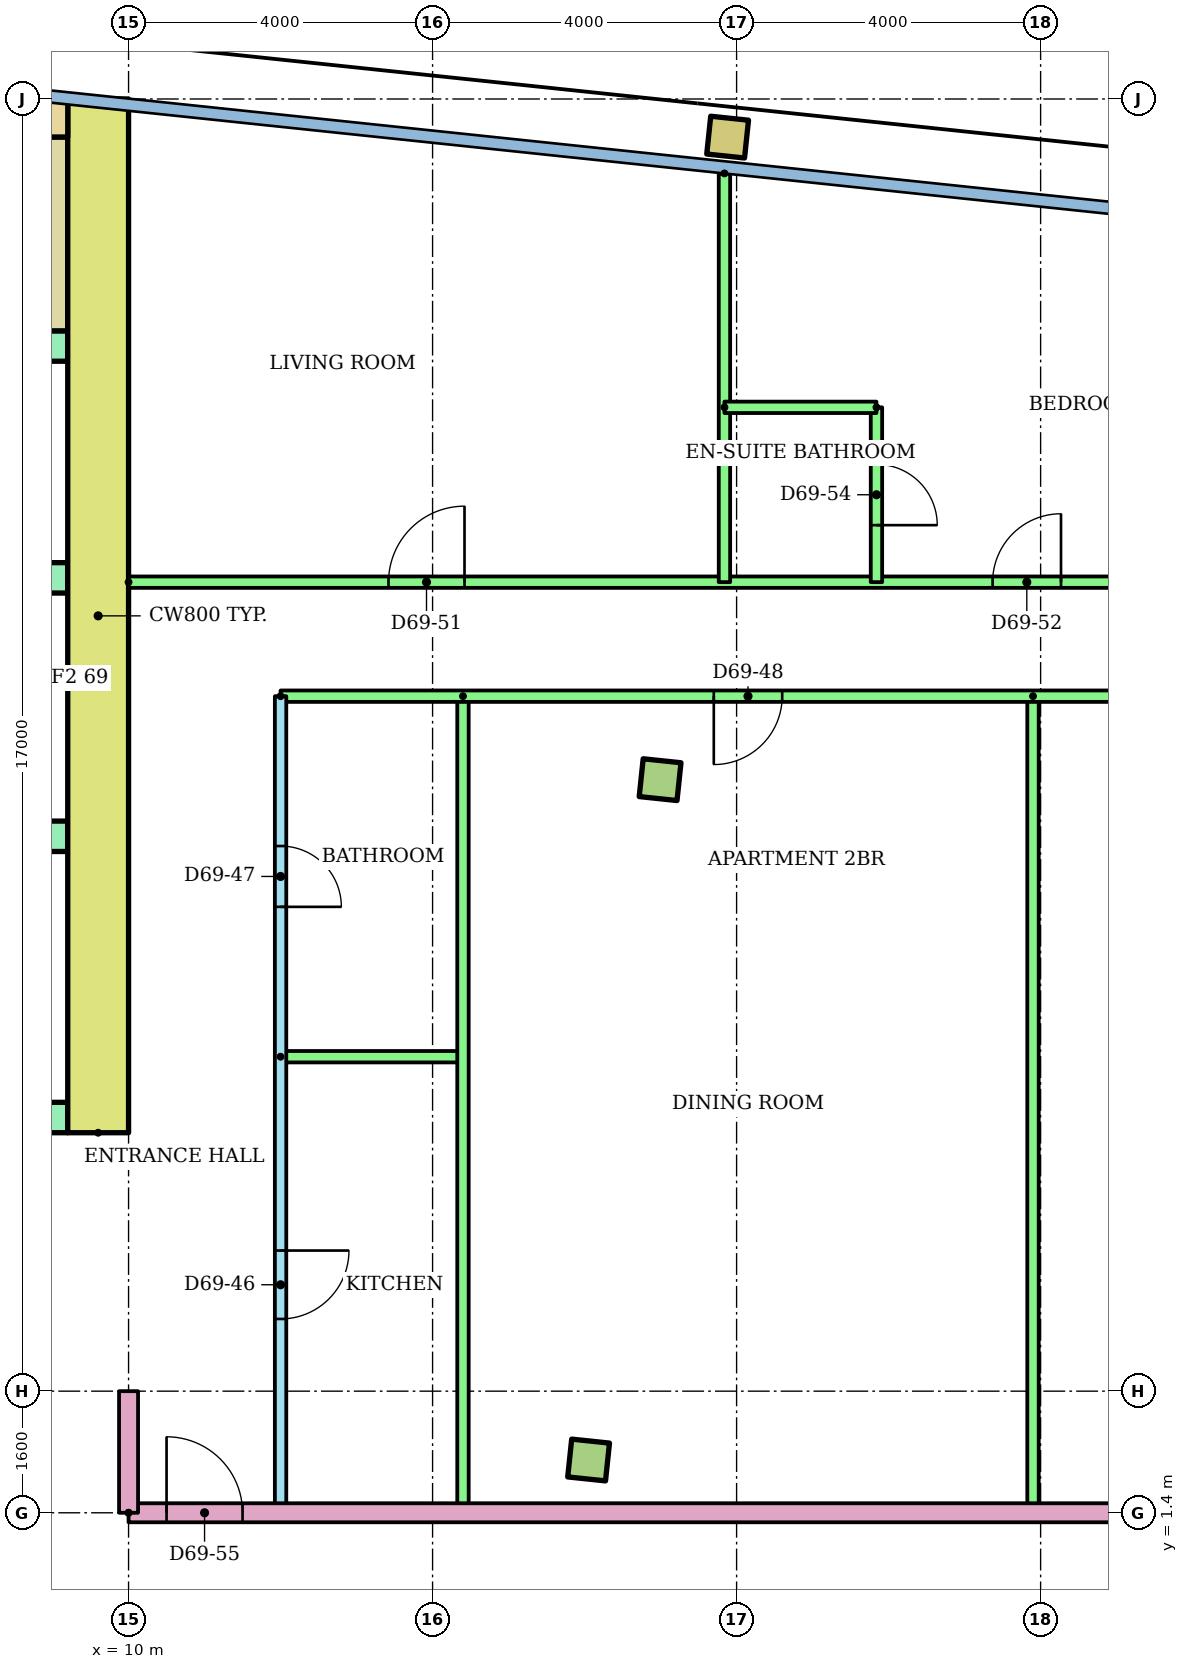
"""IFC4 building model, lengths in metres.
Left out: names, types, materials, properties, quantities, classifications, styles, units other than length and angle.
Written with IfcOpenShell. Run it as: python <this file> out.ifc"""

import sys

from ifc_helpers import new_model, si_unit, direction, frame, frame_2d, origin, origin_2d, place, context, subcontext, project, spatial, rectangle, hollow_rectangle, extrude, element, fill, save


model = new_model("IFC4")
c1 = context("Model", 3, precision=1e-05, world=origin(), true_north=direction((0.0, 1.0)))
c2 = subcontext(c1, "Body", "Model", "MODEL_VIEW")
j1 = project(units=[si_unit("LENGTHUNIT", "METRE"), si_unit("PLANEANGLEUNIT", "RADIAN")], contexts=[c1])
p1 = place(None, origin())
s1 = spatial("IfcSite", under=j1, at=p1, CompositionType="ELEMENT")
p2 = place(p1, origin())
s2 = spatial("IfcBuilding", under=s1, at=p2, CompositionType="ELEMENT")
p3 = place(p2, frame((0.0, 0.0, 265.9)))
s3 = spatial("IfcBuildingStorey", under=s2, at=p3, CompositionType="ELEMENT", Elevation=265.9)
for number, where, z_axis, x_axis in (
    (1, (16.053, 2.094, 0.0), (0.0, 0.0, 1.0), (0.995, -0.105, 0.0)),
    (2, (16.993, 11.045, 0.0), (0.0, 0.0, 1.0), (0.995, -0.105, 0.0)),
):
    element("IfcColumn", number, at=place(p3, frame(where, z_axis=z_axis, x_axis=x_axis)), inside=s3, PredefinedType="COLUMN", context=c2, shape_type="SweptSolid", body=[
        extrude(rectangle(XDim=0.5, YDim=0.5, at=origin_2d()), origin(), (0.0, 0.0, 1.0), 3.2),
    ])
p4 = place(p3, frame((17.882, 19.498, 0.0), z_axis=(0.0, 0.0, 1.0), x_axis=(0.994521895368, -0.104528463268, 0.0)))
e3 = element("IfcColumn", 3, at=p4, inside=s3, PredefinedType="COLUMN", context=c2, shape_type="SweptSolid", body=[
    extrude(hollow_rectangle(XDim=0.5, YDim=0.5, WallThickness=0.025, at=origin_2d()), origin(), (0.0, 0.0, 1.0), 3.2),
])
p5 = place(p3, frame((9.6, 6.4, 0.0), z_axis=(0.0, 0.0, 1.0), x_axis=(0.0, 1.0, 0.0)))
e4 = element("IfcWall", 4, at=p5, inside=s3, PredefinedType="SHEAR", context=c2, shape_type="SweptSolid", body=[
    extrude(rectangle(XDim=13.6, YDim=0.8, at=frame_2d((6.8, 0.0))), origin(), (0.0, 0.0, 1.0), 2.92),
])
p6 = place(p3, frame((-9.2, 19.75, 0.0)))
e5 = element("IfcWall", 5, at=p6, inside=s3, PredefinedType="SHEAR", context=c2, shape_type="SweptSolid", body=[
    extrude(rectangle(XDim=18.4, YDim=0.5, at=frame_2d((9.2, 0.0))), origin(), (0.0, 0.0, 1.0), 2.92),
])
p7 = place(p3, frame((-9.2, 6.6, 0.0)))
e6 = element("IfcWall", 6, at=p7, inside=s3, PredefinedType="SHEAR", context=c2, shape_type="SweptSolid", body=[
    extrude(rectangle(XDim=18.4, YDim=0.4, at=frame_2d((9.2, 0.0))), origin(), (0.0, 0.0, 1.0), 2.92),
])
p8 = place(p7, frame((8.3, 0.0, 0.0)))
e7 = element("IfcOpeningElement", 7, at=p8, cuts=e6, PredefinedType="OPENING", context=c2, shape_type="SweptSolid", body=[
    extrude(rectangle(XDim=1.8, YDim=2.1, at=frame_2d((0.9, 1.05))), frame((0.0, 0.21, 0.0), z_axis=(0.0, -1.0, 0.0), x_axis=(1.0, 0.0, 0.0)), (0.0, 0.0, 1.0), 0.42),
])
p9 = place(p7, frame((3.8, 0.0, 0.0)))
e8 = element("IfcOpeningElement", 8, at=p9, cuts=e6, PredefinedType="OPENING", context=c2, shape_type="SweptSolid", body=[
    extrude(rectangle(XDim=1.8, YDim=2.1, at=frame_2d((0.9, 1.05))), frame((0.0, 0.21, 0.0), z_axis=(0.0, -1.0, 0.0), x_axis=(1.0, 0.0, 0.0)), (0.0, 0.0, 1.0), 0.42),
])
p10 = place(p7, frame((12.8, 0.0, 0.0)))
e9 = element("IfcOpeningElement", 9, at=p10, cuts=e6, PredefinedType="OPENING", context=c2, shape_type="SweptSolid", body=[
    extrude(rectangle(XDim=1.8, YDim=2.1, at=frame_2d((0.9, 1.05))), frame((0.0, 0.21, 0.0), z_axis=(0.0, -1.0, 0.0), x_axis=(1.0, 0.0, 0.0)), (0.0, 0.0, 1.0), 0.42),
])
p11 = place(p3, frame((1.2, 10.3, 0.0)))
e10 = element("IfcWall", 10, at=p11, inside=s3, PredefinedType="SHEAR", context=c2, shape_type="SweptSolid", body=[
    extrude(rectangle(XDim=8.0, YDim=0.4, at=frame_2d((4.0, 0.0))), origin(), (0.0, 0.0, 1.0), 2.92),
])
p12 = place(p11, frame((0.817, 0.0, 0.0)))
e11 = element("IfcOpeningElement", 11, at=p12, cuts=e10, PredefinedType="OPENING", context=c2, shape_type="SweptSolid", body=[
    extrude(rectangle(XDim=1.1, YDim=2.1, at=frame_2d((0.55, 1.05))), frame((0.0, 0.21, 0.0), z_axis=(0.0, -1.0, 0.0), x_axis=(1.0, 0.0, 0.0)), (0.0, 0.0, 1.0), 0.42),
])
p13 = place(p11, frame((3.55, 0.0, 0.0)))
e12 = element("IfcOpeningElement", 12, at=p13, cuts=e10, PredefinedType="OPENING", context=c2, shape_type="SweptSolid", body=[
    extrude(rectangle(XDim=1.1, YDim=2.1, at=frame_2d((0.55, 1.05))), frame((0.0, 0.21, 0.0), z_axis=(0.0, -1.0, 0.0), x_axis=(1.0, 0.0, 0.0)), (0.0, 0.0, 1.0), 0.42),
])
p14 = place(p11, frame((6.283, 0.0, 0.0)))
e13 = element("IfcOpeningElement", 13, at=p14, cuts=e10, PredefinedType="OPENING", context=c2, shape_type="SweptSolid", body=[
    extrude(rectangle(XDim=1.1, YDim=2.1, at=frame_2d((0.55, 1.05))), frame((0.0, 0.21, 0.0), z_axis=(0.0, -1.0, 0.0), x_axis=(1.0, 0.0, 0.0)), (0.0, 0.0, 1.0), 0.42),
])
p15 = place(p3, frame((1.2, 13.7, 0.0)))
e14 = element("IfcWall", 14, at=p15, inside=s3, PredefinedType="SHEAR", context=c2, shape_type="SweptSolid", body=[
    extrude(rectangle(XDim=8.0, YDim=0.4, at=frame_2d((4.0, 0.0))), origin(), (0.0, 0.0, 1.0), 2.92),
])
p16 = place(p3, frame((-9.2, 16.75, 0.0)))
e15 = element("IfcWall", 15, at=p16, inside=s3, PredefinedType="SHEAR", context=c2, shape_type="SweptSolid", body=[
    extrude(rectangle(XDim=18.4, YDim=0.4, at=frame_2d((9.2, 0.0))), origin(), (0.0, 0.0, 1.0), 2.92),
])
p17 = place(p16, frame((0.1, 0.0, 0.0)))
e16 = element("IfcOpeningElement", 16, at=p17, cuts=e15, PredefinedType="OPENING", context=c2, shape_type="SweptSolid", body=[
    extrude(rectangle(XDim=0.95, YDim=2.1, at=frame_2d((0.475, 1.05))), frame((0.0, 0.21, 0.0), z_axis=(0.0, -1.0, 0.0), x_axis=(1.0, 0.0, 0.0)), (0.0, 0.0, 1.0), 0.42),
])
p18 = place(p16, frame((6.1, 0.0, 0.0)))
e17 = element("IfcOpeningElement", 17, at=p18, cuts=e15, PredefinedType="OPENING", context=c2, shape_type="SweptSolid", body=[
    extrude(rectangle(XDim=0.95, YDim=2.1, at=frame_2d((0.475, 1.05))), frame((0.0, 0.21, 0.0), z_axis=(0.0, -1.0, 0.0), x_axis=(1.0, 0.0, 0.0)), (0.0, 0.0, 1.0), 0.42),
])
p19 = place(p16, frame((12.1, 0.0, 0.0)))
e18 = element("IfcOpeningElement", 18, at=p19, cuts=e15, PredefinedType="OPENING", context=c2, shape_type="SweptSolid", body=[
    extrude(rectangle(XDim=0.95, YDim=2.1, at=frame_2d((0.475, 1.05))), frame((0.0, 0.21, 0.0), z_axis=(0.0, -1.0, 0.0), x_axis=(1.0, 0.0, 0.0)), (0.0, 0.0, 1.0), 0.42),
])
p20 = place(p3, frame((8.75, 16.95, 0.0), z_axis=(0.0, 0.0, 1.0), x_axis=(0.0, 1.0, 0.0)))
e19 = element("IfcWall", 19, at=p20, inside=s3, PredefinedType="SHEAR", context=c2, shape_type="SweptSolid", body=[
    extrude(rectangle(XDim=2.55, YDim=0.9, at=frame_2d((1.275, 0.0))), origin(), (0.0, 0.0, 1.0), 2.92),
])
p21 = place(p3, frame((12.0, 12.143, 0.0), z_axis=(0.0, 0.0, 1.0), x_axis=(0.0, -1.0, 0.0)))
e20 = element("IfcWall", 20, at=p21, inside=s3, PredefinedType="PARTITIONING", context=c2, shape_type="SweptSolid", body=[
    extrude(rectangle(XDim=10.743, YDim=0.15, at=frame_2d((5.372, 0.0))), origin(), (0.0, 0.0, 1.0), 2.4),
])
p22 = place(p21, frame((7.293, 0.0, 0.0)))
e21 = element("IfcOpeningElement", 21, at=p22, cuts=e20, PredefinedType="OPENING", context=c2, shape_type="SweptSolid", body=[
    extrude(rectangle(XDim=0.9, YDim=2.1, at=frame_2d((0.45, 1.05))), frame((0.0, 0.085, 0.0), z_axis=(0.0, -1.0, 0.0), x_axis=(1.0, 0.0, 0.0)), (0.0, 0.0, 1.0), 0.17),
])
p23 = place(p21, frame((1.972, 0.0, 0.0)))
e22 = element("IfcOpeningElement", 22, at=p23, cuts=e20, PredefinedType="OPENING", context=c2, shape_type="SweptSolid", body=[
    extrude(rectangle(XDim=0.8, YDim=2.1, at=frame_2d((0.4, 1.05))), frame((0.0, 0.085, 0.0), z_axis=(0.0, -1.0, 0.0), x_axis=(1.0, 0.0, 0.0)), (0.0, 0.0, 1.0), 0.17),
])
p24 = place(p3, frame((12.0, 7.4, 0.0)))
e23 = element("IfcWall", 23, at=p24, inside=s3, PredefinedType="PARTITIONING", context=c2, shape_type="SweptSolid", body=[
    extrude(rectangle(XDim=2.4, YDim=0.15, at=frame_2d((1.2, 0.0))), origin(), (0.0, 0.0, 1.0), 2.4),
])
for number, where, z_axis, x_axis in (
    (24, (14.4, 12.143, 0.0), (0.0, 0.0, 1.0), (0.0, -1.0, 0.0)),
    (25, (21.9, 12.143, 0.0), (0.0, 0.0, 1.0), (0.0, -1.0, 0.0)),
):
    element("IfcWall", number, at=place(p3, frame(where, z_axis=z_axis, x_axis=x_axis)), inside=s3, PredefinedType="PARTITIONING", context=c2, shape_type="SweptSolid", body=[
        extrude(rectangle(XDim=10.743, YDim=0.15, at=frame_2d((5.372, 0.0))), origin(), (0.0, 0.0, 1.0), 2.4),
    ])
p25 = place(p3, frame((32.213, 12.143, 0.0), z_axis=(0.0, 0.0, 1.0), x_axis=(-1.0, 0.0, 0.0)))
e26 = element("IfcWall", 26, at=p25, inside=s3, PredefinedType="PARTITIONING", context=c2, shape_type="SweptSolid", body=[
    extrude(rectangle(XDim=20.213, YDim=0.15, at=frame_2d((10.106, 0.0))), origin(), (0.0, 0.0, 1.0), 2.4),
])
p26 = place(p25, frame((13.613, 0.0, 0.0)))
e27 = element("IfcOpeningElement", 27, at=p26, cuts=e26, PredefinedType="OPENING", context=c2, shape_type="SweptSolid", body=[
    extrude(rectangle(XDim=0.9, YDim=2.1, at=frame_2d((0.45, 1.05))), frame((0.0, 0.085, 0.0), z_axis=(0.0, -1.0, 0.0), x_axis=(1.0, 0.0, 0.0)), (0.0, 0.0, 1.0), 0.17),
])
p27 = place(p25, frame((6.988, 0.0, 0.0)))
e28 = element("IfcOpeningElement", 28, at=p27, cuts=e26, PredefinedType="OPENING", context=c2, shape_type="SweptSolid", body=[
    extrude(rectangle(XDim=0.9, YDim=2.1, at=frame_2d((0.45, 1.05))), frame((0.0, 0.085, 0.0), z_axis=(0.0, -1.0, 0.0), x_axis=(1.0, 0.0, 0.0)), (0.0, 0.0, 1.0), 0.17),
])
p28 = place(p25, frame((1.909, 0.0, 0.0)))
e29 = element("IfcOpeningElement", 29, at=p28, cuts=e26, PredefinedType="OPENING", context=c2, shape_type="SweptSolid", body=[
    extrude(rectangle(XDim=0.9, YDim=2.1, at=frame_2d((0.45, 1.05))), frame((0.0, 0.085, 0.0), z_axis=(0.0, -1.0, 0.0), x_axis=(1.0, 0.0, 0.0)), (0.0, 0.0, 1.0), 0.17),
])
p29 = place(p3, frame((10.0, 13.643, 0.0)))
e30 = element("IfcWall", 30, at=p29, inside=s3, PredefinedType="PARTITIONING", context=c2, shape_type="SweptSolid", body=[
    extrude(rectangle(XDim=20.641, YDim=0.15, at=frame_2d((10.32, 0.0))), origin(), (0.0, 0.0, 1.0), 2.4),
])
p30 = place(p29, frame((3.42, 0.0, 0.0)))
e31 = element("IfcOpeningElement", 31, at=p30, cuts=e30, PredefinedType="OPENING", context=c2, shape_type="SweptSolid", body=[
    extrude(rectangle(XDim=1.0, YDim=2.1, at=frame_2d((0.5, 1.05))), frame((0.0, 0.085, 0.0), z_axis=(0.0, -1.0, 0.0), x_axis=(1.0, 0.0, 0.0)), (0.0, 0.0, 1.0), 0.17),
])
p31 = place(p29, frame((11.368, 0.0, 0.0)))
e32 = element("IfcOpeningElement", 32, at=p31, cuts=e30, PredefinedType="OPENING", context=c2, shape_type="SweptSolid", body=[
    extrude(rectangle(XDim=0.9, YDim=2.1, at=frame_2d((0.45, 1.05))), frame((0.0, 0.085, 0.0), z_axis=(0.0, -1.0, 0.0), x_axis=(1.0, 0.0, 0.0)), (0.0, 0.0, 1.0), 0.17),
])
p32 = place(p29, frame((18.477, 0.0, 0.0)))
e33 = element("IfcOpeningElement", 33, at=p32, cuts=e30, PredefinedType="OPENING", context=c2, shape_type="SweptSolid", body=[
    extrude(rectangle(XDim=0.9, YDim=2.1, at=frame_2d((0.45, 1.05))), frame((0.0, 0.085, 0.0), z_axis=(0.0, -1.0, 0.0), x_axis=(1.0, 0.0, 0.0)), (0.0, 0.0, 1.0), 0.17),
])
p33 = place(p3, frame((17.84, 19.021, 0.0), z_axis=(0.0, 0.0, 1.0), x_axis=(0.0, -1.0, 0.0)))
e34 = element("IfcWall", 34, at=p33, inside=s3, PredefinedType="PARTITIONING", context=c2, shape_type="SweptSolid", body=[
    extrude(rectangle(XDim=5.378, YDim=0.15, at=frame_2d((2.689, 0.0))), origin(), (0.0, 0.0, 1.0), 2.4),
])
p34 = place(p3, frame((19.84, 15.943, 0.0), z_axis=(0.0, 0.0, 1.0), x_axis=(0.0, -1.0, 0.0)))
e35 = element("IfcWall", 35, at=p34, inside=s3, PredefinedType="PARTITIONING", context=c2, shape_type="SweptSolid", body=[
    extrude(rectangle(XDim=2.3, YDim=0.15, at=frame_2d((1.15, 0.0))), origin(), (0.0, 0.0, 1.0), 2.4),
])
p35 = place(p34, frame((0.75, 0.0, 0.0)))
e36 = element("IfcOpeningElement", 36, at=p35, cuts=e35, PredefinedType="OPENING", context=c2, shape_type="SweptSolid", body=[
    extrude(rectangle(XDim=0.8, YDim=2.1, at=frame_2d((0.4, 1.05))), frame((0.0, 0.085, 0.0), z_axis=(0.0, -1.0, 0.0), x_axis=(1.0, 0.0, 0.0)), (0.0, 0.0, 1.0), 0.17),
])
p36 = place(p3, frame((17.84, 15.943, 0.0)))
e37 = element("IfcWall", 37, at=p36, inside=s3, PredefinedType="PARTITIONING", context=c2, shape_type="SweptSolid", body=[
    extrude(rectangle(XDim=2.0, YDim=0.15, at=frame_2d((1.0, 0.0))), origin(), (0.0, 0.0, 1.0), 2.4),
])
p37 = place(p3, frame((10.0, 1.4, 0.0)))
e38 = element("IfcWall", 38, at=p37, inside=s3, PredefinedType="PARTITIONING", context=c2, shape_type="SweptSolid", body=[
    extrude(rectangle(XDim=15.0, YDim=0.25, at=frame_2d((7.5, 0.0))), origin(), (0.0, 0.0, 1.0), 2.4),
])
p38 = place(p37, frame((0.5, 0.0, 0.0)))
e39 = element("IfcOpeningElement", 39, at=p38, cuts=e38, PredefinedType="OPENING", context=c2, shape_type="SweptSolid", body=[
    extrude(rectangle(XDim=1.0, YDim=2.1, at=frame_2d((0.5, 1.05))), frame((0.0, 0.135, 0.0), z_axis=(0.0, -1.0, 0.0), x_axis=(1.0, 0.0, 0.0)), (0.0, 0.0, 1.0), 0.27),
])
p39 = place(p3, frame((10.0, 1.4, 0.0), z_axis=(0.0, 0.0, 1.0), x_axis=(0.0, 1.0, 0.0)))
e40 = element("IfcWall", 40, at=p39, inside=s3, PredefinedType="PARTITIONING", context=c2, shape_type="SweptSolid", body=[
    extrude(rectangle(XDim=1.6, YDim=0.25, at=frame_2d((0.8, 0.0))), origin(), (0.0, 0.0, 1.0), 2.4),
])
p40 = place(p22, origin())
e41 = element("IfcDoor", 41, at=p40, inside=s3, OperationType="SINGLE_SWING_LEFT", PredefinedType="DOOR", context=c2, shape_type="SweptSolid", body=[
    extrude(rectangle(XDim=0.9, YDim=2.1, at=frame_2d((0.45, 1.05))), frame((0.0, 0.025, 0.0), z_axis=(0.0, -1.0, 0.0), x_axis=(1.0, 0.0, 0.0)), (0.0, 0.0, 1.0), 0.05),
])
fill(e21, e41)
p41 = place(p23, origin())
e42 = element("IfcDoor", 42, at=p41, inside=s3, OperationType="SINGLE_SWING_RIGHT", PredefinedType="DOOR", context=c2, shape_type="SweptSolid", body=[
    extrude(rectangle(XDim=0.8, YDim=2.1, at=frame_2d((0.4, 1.05))), frame((0.0, 0.025, 0.0), z_axis=(0.0, -1.0, 0.0), x_axis=(1.0, 0.0, 0.0)), (0.0, 0.0, 1.0), 0.05),
])
fill(e22, e42)
p42 = place(p26, origin())
e43 = element("IfcDoor", 43, at=p42, inside=s3, OperationType="SINGLE_SWING_RIGHT", PredefinedType="DOOR", context=c2, shape_type="SweptSolid", body=[
    extrude(rectangle(XDim=0.9, YDim=2.1, at=frame_2d((0.45, 1.05))), frame((0.0, 0.025, 0.0), z_axis=(0.0, -1.0, 0.0), x_axis=(1.0, 0.0, 0.0)), (0.0, 0.0, 1.0), 0.05),
])
fill(e27, e43)
p43 = place(p30, origin())
e44 = element("IfcDoor", 44, at=p43, inside=s3, OperationType="SINGLE_SWING_RIGHT", PredefinedType="DOOR", context=c2, shape_type="SweptSolid", body=[
    extrude(rectangle(XDim=1.0, YDim=2.1, at=frame_2d((0.5, 1.05))), frame((0.0, 0.025, 0.0), z_axis=(0.0, -1.0, 0.0), x_axis=(1.0, 0.0, 0.0)), (0.0, 0.0, 1.0), 0.05),
])
fill(e31, e44)
p44 = place(p31, origin())
e45 = element("IfcDoor", 45, at=p44, inside=s3, OperationType="SINGLE_SWING_RIGHT", PredefinedType="DOOR", context=c2, shape_type="SweptSolid", body=[
    extrude(rectangle(XDim=0.9, YDim=2.1, at=frame_2d((0.45, 1.05))), frame((0.0, 0.025, 0.0), z_axis=(0.0, -1.0, 0.0), x_axis=(1.0, 0.0, 0.0)), (0.0, 0.0, 1.0), 0.05),
])
fill(e32, e45)
p45 = place(p35, origin())
e46 = element("IfcDoor", 46, at=p45, inside=s3, OperationType="SINGLE_SWING_RIGHT", PredefinedType="DOOR", context=c2, shape_type="SweptSolid", body=[
    extrude(rectangle(XDim=0.8, YDim=2.1, at=frame_2d((0.4, 1.05))), frame((0.0, 0.025, 0.0), z_axis=(0.0, -1.0, 0.0), x_axis=(1.0, 0.0, 0.0)), (0.0, 0.0, 1.0), 0.05),
])
fill(e36, e46)
p46 = place(p38, origin())
e47 = element("IfcDoor", 47, at=p46, inside=s3, OperationType="SINGLE_SWING_LEFT", PredefinedType="DOOR", context=c2, shape_type="SweptSolid", body=[
    extrude(rectangle(XDim=1.0, YDim=2.1, at=frame_2d((0.5, 1.05))), frame((0.0, 0.025, 0.0), z_axis=(0.0, -1.0, 0.0), x_axis=(1.0, 0.0, 0.0)), (0.0, 0.0, 1.0), 0.05),
])
fill(e39, e47)
save(model, sys.argv[1])
